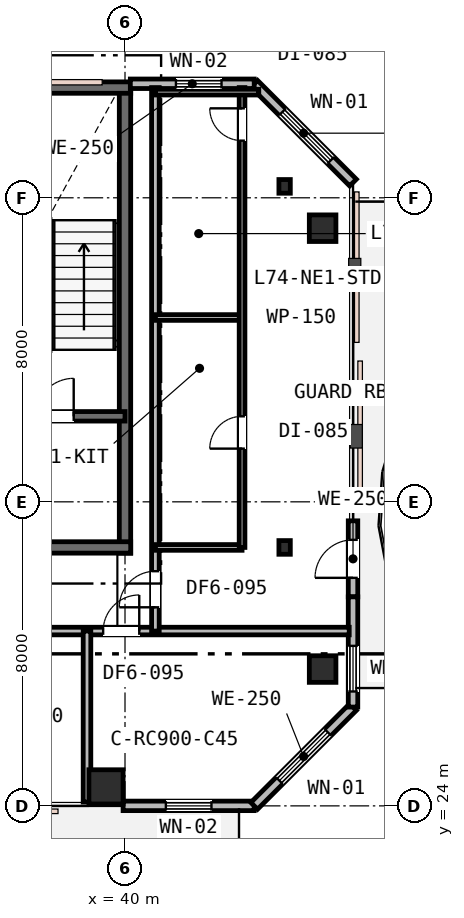
"""IFC4 building model, lengths in metres.
Left out: names, types, materials, properties, quantities, classifications, styles, units other than length and angle.
Written with IfcOpenShell. Run it as: python <this file> out.ifc"""

import sys

from ifc_helpers import new_model, si_unit, direction, frame, frame_2d, origin, origin_2d, place, context, subcontext, project, spatial, rectangle, i_section, extrude, element, fill, save


model = new_model("IFC4")
c1 = context("Model", 3, precision=1e-05, world=origin(), true_north=direction((0.0, 1.0)))
c2 = subcontext(c1, "Body", "Model", "MODEL_VIEW")
j1 = project(units=[si_unit("LENGTHUNIT", "METRE"), si_unit("PLANEANGLEUNIT", "RADIAN")], contexts=[c1])
p1 = place(None, origin())
s1 = spatial("IfcSite", under=j1, at=p1, CompositionType="ELEMENT")
p2 = place(p1, origin())
s2 = spatial("IfcBuilding", under=s1, at=p2, CompositionType="ELEMENT")
p3 = place(p2, frame((0.0, 0.0, 286.8)))
s3 = spatial("IfcBuildingStorey", under=s2, at=p3, CompositionType="ELEMENT", Elevation=286.8)
p4 = place(p3, frame((40.0, 30.65, 0.0), z_axis=(0.0, 0.0, 1.0), x_axis=(0.0, 1.0, 0.0)))
e1 = element("IfcWall", 1, at=p4, inside=s3, PredefinedType="SHEAR", context=c2, shape_type="SweptSolid", body=[
    extrude(rectangle(XDim=12.3, YDim=0.3, at=frame_2d((6.15, 0.0))), origin(), (0.0, 0.0, 1.0), 3.8),
])
p5 = place(p3, frame((15.85, 42.9, 0.0), z_axis=(0.0, 0.0, 1.0), x_axis=(1.0, 0.0, 0.0)))
e2 = element("IfcWall", 2, at=p5, inside=s3, PredefinedType="SHEAR", context=c2, shape_type="SweptSolid", body=[
    extrude(rectangle(XDim=24.3, YDim=0.3, at=frame_2d((12.15, 0.0))), origin(), (0.0, 0.0, 1.0), 3.8),
])
p6 = place(p3, frame((28.95, 30.8, 0.0), z_axis=(0.0, 0.0, 1.0), x_axis=(1.0, 0.0, 0.0)))
e3 = element("IfcWall", 3, at=p6, inside=s3, PredefinedType="SHEAR", context=c2, shape_type="SweptSolid", body=[
    extrude(rectangle(XDim=11.2, YDim=0.3, at=frame_2d((5.6, 0.0))), origin(), (0.0, 0.0, 1.0), 3.8),
])
p7 = place(p6, frame((7.65, 0.0, 0.0)))
e4 = element("IfcOpeningElement", 4, at=p7, cuts=e3, PredefinedType="OPENING", context=c2, shape_type="SweptSolid", body=[
    extrude(rectangle(XDim=1.1, YDim=2.15, at=frame_2d((0.55, 1.075))), frame((0.0, 0.16, 0.0), z_axis=(0.0, -1.0, 0.0), x_axis=(1.0, 0.0, 0.0)), (0.0, 0.0, 1.0), 0.32),
])
p8 = place(p3, frame((33.95, 34.25, 0.0), z_axis=(0.0, 0.0, 1.0), x_axis=(1.0, 0.0, 0.0)))
e5 = element("IfcWall", 5, at=p8, inside=s3, PredefinedType="SHEAR", context=c2, shape_type="SweptSolid", body=[
    extrude(rectangle(XDim=6.05, YDim=0.25, at=frame_2d((3.025, 0.0))), origin(), (0.0, 0.0, 1.0), 3.8),
])
p9 = place(p8, frame((3.7, 0.0, 0.0)))
e6 = element("IfcOpeningElement", 6, at=p9, cuts=e5, PredefinedType="OPENING", context=c2, shape_type="SweptSolid", body=[
    extrude(rectangle(XDim=1.0, YDim=2.15, at=frame_2d((0.5, 1.075))), frame((0.0, 0.135, 0.0), z_axis=(0.0, -1.0, 0.0), x_axis=(1.0, 0.0, 0.0)), (0.0, 0.0, 1.0), 0.27),
])
p10 = place(p8, frame((0.55, 0.0, 0.0)))
e7 = element("IfcOpeningElement", 7, at=p10, cuts=e5, PredefinedType="OPENING", context=c2, shape_type="SweptSolid", body=[
    extrude(rectangle(XDim=1.1, YDim=2.15, at=frame_2d((0.55, 1.075))), frame((0.0, 0.135, 0.0), z_axis=(0.0, -1.0, 0.0), x_axis=(1.0, 0.0, 0.0)), (0.0, 0.0, 1.0), 0.27),
])
p11 = place(p3, frame((39.5, 24.5, 0.0), z_axis=(0.0, 0.0, 1.0), x_axis=(1.0, 0.0, 0.0)))
e8 = element("IfcColumn", 8, at=p11, inside=s3, PredefinedType="COLUMN", context=c2, shape_type="SweptSolid", body=[
    extrude(rectangle(XDim=0.9, YDim=0.9, at=origin_2d()), origin(), (0.0, 0.0, 1.0), 3.8),
])
for number, where, z_axis, x_axis in (
    (9, (45.2, 27.6, 0.0), (0.0, 0.0, 1.0), (1.0, 0.0, 0.0)),
    (10, (45.2, 39.2, 0.0), (0.0, 0.0, 1.0), (1.0, 0.0, 0.0)),
):
    element("IfcColumn", number, at=place(p3, frame(where, z_axis=z_axis, x_axis=x_axis)), inside=s3, PredefinedType="COLUMN", context=c2, shape_type="SweptSolid", body=[
        extrude(rectangle(XDim=0.7, YDim=0.7, at=origin_2d()), origin(), (0.0, 0.0, 1.0), 3.8),
    ])
for number, where, z_axis, x_axis in (
    (11, (44.2, 30.8, 0.0), (0.0, 0.0, 1.0), (1.0, 0.0, 0.0)),
    (12, (44.2, 40.3, 0.0), (0.0, 0.0, 1.0), (1.0, 0.0, 0.0)),
):
    element("IfcColumn", number, at=place(p3, frame(where, z_axis=z_axis, x_axis=x_axis)), inside=s3, PredefinedType="COLUMN", context=c2, shape_type="SweptSolid", body=[
        extrude(i_section(OverallWidth=0.3, OverallDepth=0.36, WebThickness=0.013, FlangeThickness=0.022, FilletRadius=0.027, at=origin_2d()), origin(), (0.0, 0.0, 1.0), 3.8),
    ])
p12 = place(p3, frame((39.95, 24.0, 0.0), z_axis=(0.0, 0.0, 1.0), x_axis=(1.0, 0.0, 0.0)))
e13 = element("IfcWall", 13, at=p12, inside=s3, PredefinedType="STANDARD", context=c2, shape_type="SweptSolid", body=[
    extrude(rectangle(XDim=3.45, YDim=0.25, at=frame_2d((1.725, 0.0))), origin(), (0.0, 0.0, 1.0), 3.47),
])
p13 = place(p12, frame((1.125, 0.0, 0.85)))
e14 = element("IfcOpeningElement", 14, at=p13, cuts=e13, PredefinedType="OPENING", context=c2, shape_type="SweptSolid", body=[
    extrude(rectangle(XDim=1.2, YDim=1.6, at=frame_2d((0.6, 0.8))), frame((0.0, 0.135, 0.0), z_axis=(0.0, -1.0, 0.0), x_axis=(1.0, 0.0, 0.0)), (0.0, 0.0, 1.0), 0.27),
])
p14 = place(p3, frame((43.4, 24.0, 0.0), z_axis=(0.0, 0.0, 1.0), x_axis=(0.707106781187, 0.707106781187, 0.0)))
e15 = element("IfcWall", 15, at=p14, inside=s3, PredefinedType="STANDARD", context=c2, shape_type="SweptSolid", body=[
    extrude(rectangle(XDim=3.677, YDim=0.25, at=frame_2d((1.839, 0.0))), origin(), (0.0, 0.0, 1.0), 3.47),
])
p15 = place(p14, frame((0.939, 0.0, 0.75)))
e16 = element("IfcOpeningElement", 16, at=p15, cuts=e15, PredefinedType="OPENING", context=c2, shape_type="SweptSolid", body=[
    extrude(rectangle(XDim=1.8, YDim=1.85, at=frame_2d((0.9, 0.925))), frame((0.0, 0.135, 0.0), z_axis=(0.0, -1.0, 0.0), x_axis=(1.0, 0.0, 0.0)), (0.0, 0.0, 1.0), 0.27),
])
p16 = place(p3, frame((46.0, 29.5, 0.0), z_axis=(0.0, 0.0, 1.0), x_axis=(0.0, 1.0, 0.0)))
e17 = element("IfcWall", 17, at=p16, inside=s3, PredefinedType="STANDARD", context=c2, shape_type="SweptSolid", body=[
    extrude(rectangle(XDim=2.0, YDim=0.25, at=frame_2d((1.0, 0.0))), origin(), (0.0, 0.0, 1.0), 3.47),
])
p17 = place(p16, frame((0.5, 0.0, 0.0)))
e18 = element("IfcOpeningElement", 18, at=p17, cuts=e17, PredefinedType="OPENING", context=c2, shape_type="SweptSolid", body=[
    extrude(rectangle(XDim=1.0, YDim=2.15, at=frame_2d((0.5, 1.075))), frame((0.0, 0.135, 0.0), z_axis=(0.0, -1.0, 0.0), x_axis=(1.0, 0.0, 0.0)), (0.0, 0.0, 1.0), 0.27),
])
p18 = place(p3, frame((46.0, 26.6, 0.0), z_axis=(0.0, 0.0, 1.0), x_axis=(0.0, 1.0, 0.0)))
e19 = element("IfcWall", 19, at=p18, inside=s3, PredefinedType="STANDARD", context=c2, shape_type="SweptSolid", body=[
    extrude(rectangle(XDim=2.9, YDim=0.25, at=frame_2d((1.45, 0.0))), origin(), (0.0, 0.0, 1.0), 3.47),
])
p19 = place(p18, frame((0.41, 0.0, 0.85)))
e20 = element("IfcOpeningElement", 20, at=p19, cuts=e19, PredefinedType="OPENING", context=c2, shape_type="SweptSolid", body=[
    extrude(rectangle(XDim=1.2, YDim=1.6, at=frame_2d((0.6, 0.8))), frame((0.0, 0.135, 0.0), z_axis=(0.0, -1.0, 0.0), x_axis=(1.0, 0.0, 0.0)), (0.0, 0.0, 1.0), 0.27),
])
p20 = place(p3, frame((46.0, 40.4, 0.0), z_axis=(0.0, 0.0, 1.0), x_axis=(-0.707106781187, 0.707106781187, 0.0)))
e21 = element("IfcWall", 21, at=p20, inside=s3, PredefinedType="STANDARD", context=c2, shape_type="SweptSolid", body=[
    extrude(rectangle(XDim=3.677, YDim=0.25, at=frame_2d((1.839, 0.0))), origin(), (0.0, 0.0, 1.0), 3.47),
])
p21 = place(p20, frame((0.828, 0.0, 0.75)))
e22 = element("IfcOpeningElement", 22, at=p21, cuts=e21, PredefinedType="OPENING", context=c2, shape_type="SweptSolid", body=[
    extrude(rectangle(XDim=1.8, YDim=1.85, at=frame_2d((0.9, 0.925))), frame((0.0, 0.135, 0.0), z_axis=(0.0, -1.0, 0.0), x_axis=(1.0, 0.0, 0.0)), (0.0, 0.0, 1.0), 0.27),
])
p22 = place(p3, frame((43.4, 43.0, 0.0), z_axis=(0.0, 0.0, 1.0), x_axis=(-1.0, 0.0, 0.0)))
e23 = element("IfcWall", 23, at=p22, inside=s3, PredefinedType="STANDARD", context=c2, shape_type="SweptSolid", body=[
    extrude(rectangle(XDim=3.26, YDim=0.25, at=frame_2d((1.63, 0.0))), origin(), (0.0, 0.0, 1.0), 3.47),
])
p23 = place(p22, frame((0.86, 0.0, 0.85)))
e24 = element("IfcOpeningElement", 24, at=p23, cuts=e23, PredefinedType="OPENING", context=c2, shape_type="SweptSolid", body=[
    extrude(rectangle(XDim=1.2, YDim=1.6, at=frame_2d((0.6, 0.8))), frame((0.0, 0.135, 0.0), z_axis=(0.0, -1.0, 0.0), x_axis=(1.0, 0.0, 0.0)), (0.0, 0.0, 1.0), 0.27),
])
p24 = place(p3, frame((21.8, 28.6, 0.0), z_axis=(0.0, 0.0, 1.0), x_axis=(1.0, 0.0, 0.0)))
e25 = element("IfcWall", 25, at=p24, inside=s3, PredefinedType="PARTITIONING", context=c2, shape_type="SweptSolid", body=[
    extrude(rectangle(XDim=24.1, YDim=0.2, at=frame_2d((12.05, 0.0))), origin(), (0.0, 0.0, 1.0), 3.18),
])
p25 = place(p24, frame((5.525, 0.0, 0.0)))
e26 = element("IfcOpeningElement", 26, at=p25, cuts=e25, PredefinedType="OPENING", context=c2, shape_type="SweptSolid", body=[
    extrude(rectangle(XDim=0.95, YDim=2.15, at=frame_2d((0.475, 1.075))), frame((0.0, 0.11, 0.0), z_axis=(0.0, -1.0, 0.0), x_axis=(1.0, 0.0, 0.0)), (0.0, 0.0, 1.0), 0.22),
])
p26 = place(p24, frame((13.025, 0.0, 0.0)))
e27 = element("IfcOpeningElement", 27, at=p26, cuts=e25, PredefinedType="OPENING", context=c2, shape_type="SweptSolid", body=[
    extrude(rectangle(XDim=0.95, YDim=2.15, at=frame_2d((0.475, 1.075))), frame((0.0, 0.11, 0.0), z_axis=(0.0, -1.0, 0.0), x_axis=(1.0, 0.0, 0.0)), (0.0, 0.0, 1.0), 0.22),
])
p27 = place(p24, frame((17.625, 0.0, 0.0)))
e28 = element("IfcOpeningElement", 28, at=p27, cuts=e25, PredefinedType="OPENING", context=c2, shape_type="SweptSolid", body=[
    extrude(rectangle(XDim=0.95, YDim=2.15, at=frame_2d((0.475, 1.075))), frame((0.0, 0.11, 0.0), z_axis=(0.0, -1.0, 0.0), x_axis=(1.0, 0.0, 0.0)), (0.0, 0.0, 1.0), 0.22),
])
p28 = place(p3, frame((40.8, 28.6, 0.0), z_axis=(0.0, 0.0, 1.0), x_axis=(0.0, 1.0, 0.0)))
e29 = element("IfcWall", 29, at=p28, inside=s3, PredefinedType="PARTITIONING", context=c2, shape_type="SweptSolid", body=[
    extrude(rectangle(XDim=14.3, YDim=0.2, at=frame_2d((7.15, 0.0))), origin(), (0.0, 0.0, 1.0), 3.47),
])
p29 = place(p28, frame((0.625, 0.0, 0.0)))
e30 = element("IfcOpeningElement", 30, at=p29, cuts=e29, PredefinedType="OPENING", context=c2, shape_type="SweptSolid", body=[
    extrude(rectangle(XDim=0.95, YDim=2.15, at=frame_2d((0.475, 1.075))), frame((0.0, 0.11, 0.0), z_axis=(0.0, -1.0, 0.0), x_axis=(1.0, 0.0, 0.0)), (0.0, 0.0, 1.0), 0.22),
])
for number, where, z_axis, x_axis in (
    (31, (40.8, 30.8, 0.0), (0.0, 0.0, 1.0), (1.0, 0.0, 0.0)),
    (32, (40.8, 36.85, 0.0), (0.0, 0.0, 1.0), (1.0, 0.0, 0.0)),
):
    element("IfcWall", number, at=place(p3, frame(where, z_axis=z_axis, x_axis=x_axis)), inside=s3, PredefinedType="PARTITIONING", context=c2, shape_type="SweptSolid", body=[
        extrude(rectangle(XDim=2.28, YDim=0.15, at=frame_2d((1.14, 0.0))), origin(), (0.0, 0.0, 1.0), 3.47),
    ])
p30 = place(p3, frame((43.08, 30.8, 0.0), z_axis=(0.0, 0.0, 1.0), x_axis=(0.0, 1.0, 0.0)))
e33 = element("IfcWall", 33, at=p30, inside=s3, PredefinedType="PARTITIONING", context=c2, shape_type="SweptSolid", body=[
    extrude(rectangle(XDim=12.1, YDim=0.15, at=frame_2d((6.05, 0.0))), origin(), (0.0, 0.0, 1.0), 3.47),
])
p31 = place(p30, frame((2.6, 0.0, 0.0)))
e34 = element("IfcOpeningElement", 34, at=p31, cuts=e33, PredefinedType="OPENING", context=c2, shape_type="SweptSolid", body=[
    extrude(rectangle(XDim=0.85, YDim=2.15, at=frame_2d((0.425, 1.075))), frame((0.0, 0.085, 0.0), z_axis=(0.0, -1.0, 0.0), x_axis=(1.0, 0.0, 0.0)), (0.0, 0.0, 1.0), 0.17),
])
p32 = place(p30, frame((10.704, 0.0, 0.0)))
e35 = element("IfcOpeningElement", 35, at=p32, cuts=e33, PredefinedType="OPENING", context=c2, shape_type="SweptSolid", body=[
    extrude(rectangle(XDim=0.85, YDim=2.15, at=frame_2d((0.425, 1.075))), frame((0.0, 0.085, 0.0), z_axis=(0.0, -1.0, 0.0), x_axis=(1.0, 0.0, 0.0)), (0.0, 0.0, 1.0), 0.17),
])
p33 = place(p3, frame((40.8, 42.78, 0.0), z_axis=(0.0, 0.0, 1.0), x_axis=(1.0, 0.0, 0.0)))
e36 = element("IfcWall", 36, at=p33, inside=s3, PredefinedType="PARTITIONING", context=c2, shape_type="SweptSolid", body=[
    extrude(rectangle(XDim=2.72, YDim=0.15, at=frame_2d((1.36, 0.0))), origin(), (0.0, 0.0, 1.0), 3.47),
])
p34 = place(p3, frame((39.0, 24.1, 0.0), z_axis=(0.0, 0.0, 1.0), x_axis=(0.0, 1.0, 0.0)))
e37 = element("IfcWall", 37, at=p34, inside=s3, PredefinedType="PARTITIONING", context=c2, shape_type="SweptSolid", body=[
    extrude(rectangle(XDim=4.5, YDim=0.2, at=frame_2d((2.25, 0.0))), origin(), (0.0, 0.0, 1.0), 3.18),
])
p35 = place(p13, origin())
e38 = element("IfcWindow", 38, at=p35, inside=s3, PartitioningType="SINGLE_PANEL", PredefinedType="WINDOW", context=c2, shape_type="SweptSolid", body=[
    extrude(rectangle(XDim=1.2, YDim=1.6, at=frame_2d((0.6, 0.8))), frame((0.0, 0.03, 0.0), z_axis=(0.0, -1.0, 0.0), x_axis=(1.0, 0.0, 0.0)), (0.0, 0.0, 1.0), 0.06),
])
fill(e14, e38)
p36 = place(p15, origin())
e39 = element("IfcWindow", 39, at=p36, inside=s3, PartitioningType="SINGLE_PANEL", PredefinedType="WINDOW", context=c2, shape_type="SweptSolid", body=[
    extrude(rectangle(XDim=1.8, YDim=1.85, at=frame_2d((0.9, 0.925))), frame((0.0, 0.03, 0.0), z_axis=(0.0, -1.0, 0.0), x_axis=(1.0, 0.0, 0.0)), (0.0, 0.0, 1.0), 0.06),
])
fill(e16, e39)
p37 = place(p17, origin())
e40 = element("IfcDoor", 40, at=p37, inside=s3, OperationType="SINGLE_SWING_LEFT", PredefinedType="DOOR", context=c2, shape_type="SweptSolid", body=[
    extrude(rectangle(XDim=1.0, YDim=2.15, at=frame_2d((0.5, 1.075))), frame((0.0, 0.025, 0.0), z_axis=(0.0, -1.0, 0.0), x_axis=(1.0, 0.0, 0.0)), (0.0, 0.0, 1.0), 0.05),
])
fill(e18, e40)
p38 = place(p19, origin())
e41 = element("IfcWindow", 41, at=p38, inside=s3, PartitioningType="SINGLE_PANEL", PredefinedType="WINDOW", context=c2, shape_type="SweptSolid", body=[
    extrude(rectangle(XDim=1.2, YDim=1.6, at=frame_2d((0.6, 0.8))), frame((0.0, 0.03, 0.0), z_axis=(0.0, -1.0, 0.0), x_axis=(1.0, 0.0, 0.0)), (0.0, 0.0, 1.0), 0.06),
])
fill(e20, e41)
p39 = place(p21, origin())
e42 = element("IfcWindow", 42, at=p39, inside=s3, PartitioningType="SINGLE_PANEL", PredefinedType="WINDOW", context=c2, shape_type="SweptSolid", body=[
    extrude(rectangle(XDim=1.8, YDim=1.85, at=frame_2d((0.9, 0.925))), frame((0.0, 0.03, 0.0), z_axis=(0.0, -1.0, 0.0), x_axis=(1.0, 0.0, 0.0)), (0.0, 0.0, 1.0), 0.06),
])
fill(e22, e42)
p40 = place(p23, origin())
e43 = element("IfcWindow", 43, at=p40, inside=s3, PartitioningType="SINGLE_PANEL", PredefinedType="WINDOW", context=c2, shape_type="SweptSolid", body=[
    extrude(rectangle(XDim=1.2, YDim=1.6, at=frame_2d((0.6, 0.8))), frame((0.0, 0.03, 0.0), z_axis=(0.0, -1.0, 0.0), x_axis=(1.0, 0.0, 0.0)), (0.0, 0.0, 1.0), 0.06),
])
fill(e24, e43)
p41 = place(p9, origin())
e44 = element("IfcDoor", 44, at=p41, inside=s3, OperationType="SINGLE_SWING_RIGHT", PredefinedType="DOOR", context=c2, shape_type="SweptSolid", body=[
    extrude(rectangle(XDim=1.0, YDim=2.15, at=frame_2d((0.5, 1.075))), frame((0.0, 0.025, 0.0), z_axis=(0.0, -1.0, 0.0), x_axis=(1.0, 0.0, 0.0)), (0.0, 0.0, 1.0), 0.05),
])
fill(e6, e44)
p42 = place(p29, origin())
e45 = element("IfcDoor", 45, at=p42, inside=s3, OperationType="SINGLE_SWING_LEFT", PredefinedType="DOOR", context=c2, shape_type="SweptSolid", body=[
    extrude(rectangle(XDim=0.95, YDim=2.15, at=frame_2d((0.475, 1.075))), frame((0.0, 0.025, 0.0), z_axis=(0.0, -1.0, 0.0), x_axis=(1.0, 0.0, 0.0)), (0.0, 0.0, 1.0), 0.05),
])
fill(e30, e45)
p43 = place(p31, origin())
e46 = element("IfcDoor", 46, at=p43, inside=s3, OperationType="SINGLE_SWING_LEFT", PredefinedType="DOOR", context=c2, shape_type="SweptSolid", body=[
    extrude(rectangle(XDim=0.85, YDim=2.15, at=frame_2d((0.425, 1.075))), frame((0.0, 0.025, 0.0), z_axis=(0.0, -1.0, 0.0), x_axis=(1.0, 0.0, 0.0)), (0.0, 0.0, 1.0), 0.05),
])
fill(e34, e46)
p44 = place(p32, origin())
e47 = element("IfcDoor", 47, at=p44, inside=s3, OperationType="SINGLE_SWING_RIGHT", PredefinedType="DOOR", context=c2, shape_type="SweptSolid", body=[
    extrude(rectangle(XDim=0.85, YDim=2.15, at=frame_2d((0.425, 1.075))), frame((0.0, 0.025, 0.0), z_axis=(0.0, -1.0, 0.0), x_axis=(1.0, 0.0, 0.0)), (0.0, 0.0, 1.0), 0.05),
])
fill(e35, e47)
p45 = place(p27, origin())
e48 = element("IfcDoor", 48, at=p45, inside=s3, OperationType="SINGLE_SWING_RIGHT", PredefinedType="DOOR", context=c2, shape_type="SweptSolid", body=[
    extrude(rectangle(XDim=0.95, YDim=2.15, at=frame_2d((0.475, 1.075))), frame((0.0, 0.025, 0.0), z_axis=(0.0, -1.0, 0.0), x_axis=(1.0, 0.0, 0.0)), (0.0, 0.0, 1.0), 0.05),
])
fill(e28, e48)
save(model, sys.argv[1])
